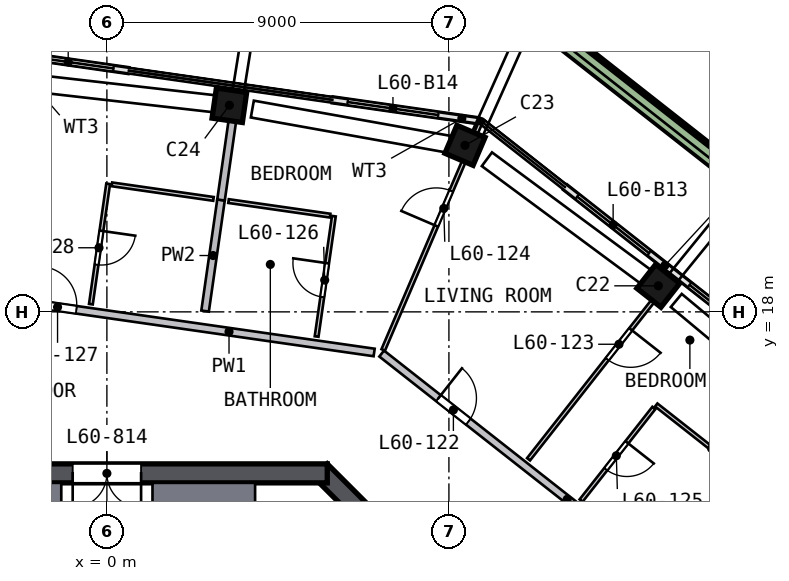
"""IFC4 building model, lengths in metres.
Left out: names, types, materials, properties, quantities, classifications, styles, units other than length and angle.
Written with IfcOpenShell. Run it as: python <this file> out.ifc"""

import sys

from ifc_helpers import new_model, si_unit, direction, frame, frame_2d, origin, origin_2d, place, context, subcontext, project, spatial, polyline, rectangle, outline, extrude, element, fill, save


model = new_model("IFC4")
c1 = context("Model", 3, precision=1e-05, world=origin(), true_north=direction((0.0, 1.0)))
c2 = subcontext(c1, "Body", "Model", "MODEL_VIEW")
j1 = project(units=[si_unit("LENGTHUNIT", "METRE"), si_unit("PLANEANGLEUNIT", "RADIAN")], contexts=[c1])
p1 = place(None, origin())
s1 = spatial("IfcSite", under=j1, at=p1, CompositionType="ELEMENT")
p2 = place(p1, origin())
s2 = spatial("IfcBuilding", under=s1, at=p2, CompositionType="ELEMENT")
p3 = place(p2, frame((0.0, 0.0, 244.5)))
s3 = spatial("IfcBuildingStorey", under=s2, at=p3, CompositionType="ELEMENT", Elevation=244.5)
p4 = place(p3, frame((14.617, 18.602, 0.0), z_axis=(-0.089052954, 0.068747968, 0.993651492), x_axis=(-0.781361755, 0.613855028, -0.112498053)))
e1 = element("IfcColumn", 1, at=p4, inside=s3, PredefinedType="COLUMN", context=c2, shape_type="SweptSolid", body=[
    extrude(rectangle(XDim=0.8, YDim=0.8, at=origin_2d()), origin(), (0.0, 0.0, 1.0), 3.21),
])
p5 = place(p3, frame((9.552, 22.329, 0.0), z_axis=(-0.106507884, 0.044549336, 0.993313358), x_axis=(0.913094462, -0.391063778, 0.115445333)))
e2 = element("IfcColumn", 2, at=p5, inside=s3, PredefinedType="COLUMN", context=c2, shape_type="SweptSolid", body=[
    extrude(rectangle(XDim=0.8, YDim=0.8, at=origin_2d()), origin(), (0.0, 0.0, 1.0), 3.211),
])
p6 = place(p3, frame((3.358, 23.419, 0.0), z_axis=(-0.111487333, 0.015057634, 0.993651771), x_axis=(-0.98354748, 0.141347432, -0.112495591)))
e3 = element("IfcColumn", 3, at=p6, inside=s3, PredefinedType="COLUMN", context=c2, shape_type="SweptSolid", body=[
    extrude(rectangle(XDim=0.8, YDim=0.8, at=origin_2d()), origin(), (0.0, 0.0, 1.0), 3.21),
])
p7 = place(p3, frame((13.823, 5.622, 0.0), z_axis=(0.0, 0.0, 1.0), x_axis=(-0.707106781, 0.707106781, 0.0)))
e4 = element("IfcWall", 4, at=p7, inside=s3, PredefinedType="SHEAR", context=c2, shape_type="SweptSolid", body=[
    extrude(rectangle(XDim=11.598, YDim=0.5, at=frame_2d((5.799, 0.0))), origin(), (0.0, 0.0, 1.0), 3.5),
])
p8 = place(p7, frame((2.099, 0.0, 0.0)))
e5 = element("IfcOpeningElement", 5, at=p8, cuts=e4, PredefinedType="OPENING", context=c2, shape_type="SweptSolid", body=[
    extrude(rectangle(XDim=1.2, YDim=2.1, at=frame_2d((0.6, 1.05))), frame((0.0, 0.26, 0.0), z_axis=(0.0, -1.0, 0.0), x_axis=(1.0, 0.0, 0.0)), (0.0, 0.0, 1.0), 0.52),
])
p9 = place(p3, frame((5.799, 13.75, 0.0), z_axis=(0.0, 0.0, 1.0), x_axis=(-1.0, 0.0, 0.0)))
e6 = element("IfcWall", 6, at=p9, inside=s3, PredefinedType="SHEAR", context=c2, shape_type="SweptSolid", body=[
    extrude(rectangle(XDim=11.598, YDim=0.5, at=frame_2d((5.799, 0.0))), origin(), (0.0, 0.0, 1.0), 3.5),
])
p10 = place(p9, frame((4.899, 0.0, 0.0)))
e7 = element("IfcOpeningElement", 7, at=p10, cuts=e6, PredefinedType="OPENING", context=c2, shape_type="SweptSolid", body=[
    extrude(rectangle(XDim=1.8, YDim=2.1, at=frame_2d((0.9, 1.05))), frame((0.0, 0.26, 0.0), z_axis=(0.0, -1.0, 0.0), x_axis=(1.0, 0.0, 0.0)), (0.0, 0.0, 1.0), 0.52),
])
p11 = place(p3, frame((17.537, 16.976, 0.0), z_axis=(0.0, 0.0, 1.0), x_axis=(-0.786266993, 0.617886896, 0.0)))
e8 = element("IfcWall", 8, at=p11, inside=s3, PredefinedType="SOLIDWALL", context=c2, shape_type="SweptSolid", body=[
    extrude(rectangle(XDim=3.3, YDim=0.15, at=frame_2d((1.65, 0.0))), origin(), (0.0, 0.0, 1.0), 2.525),
])
p12 = place(p11, frame((0.4, 0.0, 0.0)))
e9 = element("IfcOpeningElement", 9, at=p12, cuts=e8, PredefinedType="OPENING", context=c2, shape_type="SweptSolid", body=[
    extrude(rectangle(XDim=2.4, YDim=2.4, at=frame_2d((1.2, 1.2))), frame((0.0, 0.085, 0.0), z_axis=(0.0, -1.0, 0.0), x_axis=(1.0, 0.0, 0.0)), (0.0, 0.0, 1.0), 0.17),
])
p13 = place(p3, frame((14.942, 19.015, 0.0), z_axis=(0.0, 0.0, 1.0), x_axis=(-0.786290572, 0.61785689, 0.0)))
e10 = element("IfcWall", 10, at=p13, inside=s3, PredefinedType="SOLIDWALL", context=c2, shape_type="SweptSolid", body=[
    extrude(rectangle(XDim=3.661, YDim=0.15, at=frame_2d((1.831, 0.0))), origin(), (0.0, 0.0, 1.0), 2.525),
])
p14 = place(p13, frame((0.861, 0.0, 0.0)))
e11 = element("IfcOpeningElement", 11, at=p14, cuts=e10, PredefinedType="OPENING", context=c2, shape_type="SweptSolid", body=[
    extrude(rectangle(XDim=2.4, YDim=2.4, at=frame_2d((1.2, 1.2))), frame((0.0, 0.085, 0.0), z_axis=(0.0, -1.0, 0.0), x_axis=(1.0, 0.0, 0.0)), (0.0, 0.0, 1.0), 0.17),
])
p15 = place(p3, frame((9.768, 23.03, 0.0), z_axis=(0.0, 0.0, 1.0), x_axis=(-0.989874782, 0.141943354, 0.0)))
e12 = element("IfcWall", 12, at=p15, inside=s3, PredefinedType="SOLIDWALL", context=c2, shape_type="SweptSolid", body=[
    extrude(rectangle(XDim=3.863, YDim=0.15, at=frame_2d((1.932, 0.0))), origin(), (0.0, 0.0, 1.0), 2.525),
])
p16 = place(p15, frame((1.063, 0.0, 0.0)))
e13 = element("IfcOpeningElement", 13, at=p16, cuts=e12, PredefinedType="OPENING", context=c2, shape_type="SweptSolid", body=[
    extrude(rectangle(XDim=2.4, YDim=2.4, at=frame_2d((1.2, 1.2))), frame((0.0, 0.085, 0.0), z_axis=(0.0, -1.0, 0.0), x_axis=(1.0, 0.0, 0.0)), (0.0, 0.0, 1.0), 0.17),
])
p17 = place(p3, frame((0.566, 24.35, 0.0), z_axis=(0.0, 0.0, 1.0), x_axis=(-0.989878305, 0.141918786, 0.0)))
e14 = element("IfcWall", 14, at=p17, inside=s3, PredefinedType="SOLIDWALL", context=c2, shape_type="SweptSolid", body=[
    extrude(rectangle(XDim=3.504, YDim=0.15, at=frame_2d((1.752, 0.0))), origin(), (0.0, 0.0, 1.0), 2.525),
])
p18 = place(p17, frame((0.4, 0.0, 0.0)))
e15 = element("IfcOpeningElement", 15, at=p18, cuts=e14, PredefinedType="OPENING", context=c2, shape_type="SweptSolid", body=[
    extrude(rectangle(XDim=2.4, YDim=2.4, at=frame_2d((1.2, 1.2))), frame((0.0, 0.085, 0.0), z_axis=(0.0, -1.0, 0.0), x_axis=(1.0, 0.0, 0.0)), (0.0, 0.0, 1.0), 0.17),
])
p19 = place(p3, frame((21.529, 17.687, 0.0), z_axis=(0.0, 0.0, 1.0), x_axis=(-0.78629143, 0.617855798, 0.0)))
e16 = element("IfcWall", 16, at=p19, inside=s3, PredefinedType="SOLIDWALL", context=c2, shape_type="SweptSolid", body=[
    extrude(rectangle(XDim=13.223, YDim=0.5, at=frame_2d((6.612, 0.0))), origin(), (0.0, 0.0, 1.0), 0.7),
])
p20 = place(p3, origin())
e17 = element("IfcWall", 17, at=p20, inside=s3, PredefinedType="SOLIDWALL", context=c2, shape_type="SweptSolid", body=[
    extrude(outline(polyline([(3.9, 9.9), (3.7, 9.9), (3.7, 12.9), (1.4, 12.9), (1.4, 9.9), (1.2, 9.9), (1.2, 13.5), (3.9, 13.5), (3.9, 9.9)])), origin(), (0.0, 0.0, 1.0), 3.19),
])
p21 = place(p3, origin())
e18 = element("IfcWall", 18, at=p21, inside=s3, PredefinedType="SOLIDWALL", context=c2, shape_type="SweptSolid", body=[
    extrude(outline(polyline([(-3.9, 13.5), (-1.2, 13.5), (-1.2, 9.9), (-1.4, 9.9), (-1.4, 12.9), (-3.7, 12.9), (-3.7, 9.9), (-3.9, 9.9), (-3.9, 13.5)])), origin(), (0.0, 0.0, 1.0), 3.19),
])
p22 = place(p3, frame((-1.991, 18.226, 0.0), z_axis=(0.0, 0.0, 1.0), x_axis=(0.98987168, -0.141964985, 0.0)))
e19 = element("IfcWall", 19, at=p22, inside=s3, PredefinedType="SOLIDWALL", context=c2, shape_type="SweptSolid", body=[
    extrude(rectangle(XDim=9.116, YDim=0.2, at=frame_2d((4.558, 0.0))), origin(), (0.0, 0.0, 1.0), 3.19),
])
p23 = place(p22, frame((0.2, 0.0, 0.0)))
e20 = element("IfcOpeningElement", 20, at=p23, cuts=e19, PredefinedType="OPENING", context=c2, shape_type="SweptSolid", body=[
    extrude(rectangle(XDim=1.0, YDim=2.1, at=frame_2d((0.5, 1.05))), frame((0.0, 0.11, 0.0), z_axis=(0.0, -1.0, 0.0), x_axis=(1.0, 0.0, 0.0)), (0.0, 0.0, 1.0), 0.22),
])
p24 = place(p3, frame((7.231, 16.903, 0.0), z_axis=(0.0, 0.0, 1.0), x_axis=(0.786294696, -0.617851641, 0.0)))
e21 = element("IfcWall", 21, at=p24, inside=s3, PredefinedType="SOLIDWALL", context=c2, shape_type="SweptSolid", body=[
    extrude(rectangle(XDim=9.317, YDim=0.2, at=frame_2d((4.658, 0.0))), origin(), (0.0, 0.0, 1.0), 3.19),
])
p25 = place(p24, frame((1.9, 0.0, 0.0)))
e22 = element("IfcOpeningElement", 22, at=p25, cuts=e21, PredefinedType="OPENING", context=c2, shape_type="SweptSolid", body=[
    extrude(rectangle(XDim=1.0, YDim=2.1, at=frame_2d((0.5, 1.05))), frame((0.0, 0.11, 0.0), z_axis=(0.0, -1.0, 0.0), x_axis=(1.0, 0.0, 0.0)), (0.0, 0.0, 1.0), 0.22),
])
p26 = place(p3, frame((2.584, 18.021, 0.0), z_axis=(0.0, 0.0, 1.0), x_axis=(0.141965384, 0.989871623, 0.0)))
e23 = element("IfcWall", 23, at=p26, inside=s3, PredefinedType="SOLIDWALL", context=c2, shape_type="SweptSolid", body=[
    extrude(rectangle(XDim=2.953, YDim=0.2, at=frame_2d((1.476, 0.0))), origin(), (0.0, 0.0, 1.0), 3.19),
])
p27 = place(p3, frame((3.003, 20.944, 0.0), z_axis=(0.0, 0.0, 1.0), x_axis=(0.141931131, 0.989876535, 0.0)))
e24 = element("IfcWall", 24, at=p27, inside=s3, PredefinedType="SOLIDWALL", context=c2, shape_type="SweptSolid", body=[
    extrude(rectangle(XDim=2.95, YDim=0.2, at=frame_2d((1.475, 0.0))), origin(), (0.0, 0.0, 1.0), 3.19),
])
p28 = place(p3, frame((14.796, 11.085, 0.0), z_axis=(0.0, 0.0, 1.0), x_axis=(0.800291284, 0.599611424, 0.0)))
e25 = element("IfcWall", 25, at=p28, inside=s3, PredefinedType="SOLIDWALL", context=c2, shape_type="SweptSolid", body=[
    extrude(rectangle(XDim=3.418, YDim=0.2, at=frame_2d((1.709, 0.0))), origin(), (0.0, 0.0, 1.0), 3.19),
])
p29 = place(p3, frame((0.033, 21.37, 0.0), z_axis=(0.0, 0.0, 1.0), x_axis=(-0.141912692, -0.989879178, 0.0)))
e26 = element("IfcWall", 26, at=p29, inside=s3, PredefinedType="PARTITIONING", context=c2, shape_type="SweptSolid", body=[
    extrude(rectangle(XDim=3.2, YDim=0.1, at=frame_2d((1.6, 0.0))), origin(), (0.0, 0.0, 1.0), 3.19),
])
p30 = place(p29, frame((1.25, 0.0, 0.0)))
e27 = element("IfcOpeningElement", 27, at=p30, cuts=e26, PredefinedType="OPENING", context=c2, shape_type="SweptSolid", body=[
    extrude(rectangle(XDim=0.9, YDim=2.1, at=frame_2d((0.45, 1.05))), frame((0.0, 0.06, 0.0), z_axis=(0.0, -1.0, 0.0), x_axis=(1.0, 0.0, 0.0)), (0.0, 0.0, 1.0), 0.12),
])
for number, where, z_axis, x_axis in (
    (28, (0.133, 21.356, 0.0), (0.0, 0.0, 1.0), (0.99, -0.142, 0.0)),
    (29, (5.874, 20.532, 0.0), (0.0, 0.0, 1.0), (-0.99, 0.142, 0.0)),
):
    element("IfcWall", number, at=place(p3, frame(where, z_axis=z_axis, x_axis=x_axis)), inside=s3, PredefinedType="PARTITIONING", context=c2, shape_type="SweptSolid", body=[
        extrude(rectangle(XDim=2.7, YDim=0.1, at=frame_2d((1.35, 0.0))), origin(), (0.0, 0.0, 1.0), 3.19),
    ])
p31 = place(p3, frame((5.519, 17.351, 0.0), z_axis=(0.0, 0.0, 1.0), x_axis=(0.141976729, 0.989869996, 0.0)))
e30 = element("IfcWall", 30, at=p31, inside=s3, PredefinedType="PARTITIONING", context=c2, shape_type="SweptSolid", body=[
    extrude(rectangle(XDim=3.2, YDim=0.1, at=frame_2d((1.6, 0.0))), origin(), (0.0, 0.0, 1.0), 3.19),
])
p32 = place(p31, frame((1.05, 0.0, 0.0)))
e31 = element("IfcOpeningElement", 31, at=p32, cuts=e30, PredefinedType="OPENING", context=c2, shape_type="SweptSolid", body=[
    extrude(rectangle(XDim=0.9, YDim=2.1, at=frame_2d((0.45, 1.05))), frame((0.0, 0.06, 0.0), z_axis=(0.0, -1.0, 0.0), x_axis=(1.0, 0.0, 0.0)), (0.0, 0.0, 1.0), 0.12),
])
p33 = place(p3, frame((7.271, 16.998, 0.0), z_axis=(0.0, 0.0, 1.0), x_axis=(0.393295843, 0.919411975, 0.0)))
e32 = element("IfcWall", 32, at=p33, inside=s3, PredefinedType="PARTITIONING", context=c2, shape_type="SweptSolid", body=[
    extrude(rectangle(XDim=6.476, YDim=0.1, at=frame_2d((3.238, 0.0))), origin(), (0.0, 0.0, 1.0), 3.19),
])
p34 = place(p33, frame((3.55, 0.0, 0.0)))
e33 = element("IfcOpeningElement", 33, at=p34, cuts=e32, PredefinedType="OPENING", context=c2, shape_type="SweptSolid", body=[
    extrude(rectangle(XDim=1.0, YDim=2.1, at=frame_2d((0.5, 1.05))), frame((0.0, 0.06, 0.0), z_axis=(0.0, -1.0, 0.0), x_axis=(1.0, 0.0, 0.0)), (0.0, 0.0, 1.0), 0.12),
])
p35 = place(p3, frame((14.896, 18.956, 0.0), z_axis=(0.0, 0.0, 1.0), x_axis=(-0.617854862, -0.786292165, 0.0)))
e34 = element("IfcWall", 34, at=p35, inside=s3, PredefinedType="PARTITIONING", context=c2, shape_type="SweptSolid", body=[
    extrude(rectangle(XDim=6.15, YDim=0.1, at=frame_2d((3.075, 0.0))), origin(), (0.0, 0.0, 1.0), 3.19),
])
p36 = place(p35, frame((1.8, 0.0, 0.0)))
e35 = element("IfcOpeningElement", 35, at=p36, cuts=e34, PredefinedType="OPENING", context=c2, shape_type="SweptSolid", body=[
    extrude(rectangle(XDim=1.0, YDim=2.1, at=frame_2d((0.5, 1.05))), frame((0.0, 0.06, 0.0), z_axis=(0.0, -1.0, 0.0), x_axis=(1.0, 0.0, 0.0)), (0.0, 0.0, 1.0), 0.12),
])
p37 = place(p3, frame((14.394, 15.471, 0.0), z_axis=(0.0, 0.0, 1.0), x_axis=(-0.617842421, -0.786301941, 0.0)))
e36 = element("IfcWall", 36, at=p37, inside=s3, PredefinedType="PARTITIONING", context=c2, shape_type="SweptSolid", body=[
    extrude(rectangle(XDim=3.1, YDim=0.1, at=frame_2d((1.55, 0.0))), origin(), (0.0, 0.0, 1.0), 3.19),
])
p38 = place(p37, frame((1.15, 0.0, 0.0)))
e37 = element("IfcOpeningElement", 37, at=p38, cuts=e36, PredefinedType="OPENING", context=c2, shape_type="SweptSolid", body=[
    extrude(rectangle(XDim=0.9, YDim=2.1, at=frame_2d((0.45, 1.05))), frame((0.0, 0.06, 0.0), z_axis=(0.0, -1.0, 0.0), x_axis=(1.0, 0.0, 0.0)), (0.0, 0.0, 1.0), 0.12),
])
p39 = place(p3, frame((17.368, 13.262, 0.0), z_axis=(0.0, 0.0, 1.0), x_axis=(-0.786336636, 0.617798264, 0.0)))
e38 = element("IfcWall", 38, at=p39, inside=s3, PredefinedType="PARTITIONING", context=c2, shape_type="SweptSolid", body=[
    extrude(rectangle(XDim=3.704, YDim=0.1, at=frame_2d((1.852, 0.0))), origin(), (0.0, 0.0, 1.0), 3.19),
])
p40 = place(p12, origin())
e39 = element("IfcDoor", 39, at=p40, inside=s3, OperationType="SLIDING_TO_RIGHT", PredefinedType="DOOR", context=c2, shape_type="SweptSolid", body=[
    extrude(rectangle(XDim=2.4, YDim=2.4, at=frame_2d((1.2, 1.2))), frame((0.0, 0.025, 0.0), z_axis=(0.0, -1.0, 0.0), x_axis=(1.0, 0.0, 0.0)), (0.0, 0.0, 1.0), 0.05),
])
fill(e9, e39)
p41 = place(p14, origin())
e40 = element("IfcDoor", 40, at=p41, inside=s3, OperationType="SLIDING_TO_LEFT", PredefinedType="DOOR", context=c2, shape_type="SweptSolid", body=[
    extrude(rectangle(XDim=2.4, YDim=2.4, at=frame_2d((1.2, 1.2))), frame((0.0, 0.025, 0.0), z_axis=(0.0, -1.0, 0.0), x_axis=(1.0, 0.0, 0.0)), (0.0, 0.0, 1.0), 0.05),
])
fill(e11, e40)
p42 = place(p16, origin())
e41 = element("IfcDoor", 41, at=p42, inside=s3, OperationType="SLIDING_TO_LEFT", PredefinedType="DOOR", context=c2, shape_type="SweptSolid", body=[
    extrude(rectangle(XDim=2.4, YDim=2.4, at=frame_2d((1.2, 1.2))), frame((0.0, 0.025, 0.0), z_axis=(0.0, -1.0, 0.0), x_axis=(1.0, 0.0, 0.0)), (0.0, 0.0, 1.0), 0.05),
])
fill(e13, e41)
p43 = place(p18, origin())
e42 = element("IfcDoor", 42, at=p43, inside=s3, OperationType="SLIDING_TO_RIGHT", PredefinedType="DOOR", context=c2, shape_type="SweptSolid", body=[
    extrude(rectangle(XDim=2.4, YDim=2.4, at=frame_2d((1.2, 1.2))), frame((0.0, 0.025, 0.0), z_axis=(0.0, -1.0, 0.0), x_axis=(1.0, 0.0, 0.0)), (0.0, 0.0, 1.0), 0.05),
])
fill(e15, e42)
p44 = place(p10, origin())
e43 = element("IfcDoor", 43, at=p44, inside=s3, OperationType="DOUBLE_DOOR_SINGLE_SWING", PredefinedType="DOOR", context=c2, shape_type="SweptSolid", body=[
    extrude(rectangle(XDim=1.8, YDim=2.1, at=frame_2d((0.9, 1.05))), frame((0.0, 0.025, 0.0), z_axis=(0.0, -1.0, 0.0), x_axis=(1.0, 0.0, 0.0)), (0.0, 0.0, 1.0), 0.05),
])
fill(e7, e43)
p45 = place(p25, origin())
e44 = element("IfcDoor", 44, at=p45, inside=s3, OperationType="SINGLE_SWING_LEFT", PredefinedType="DOOR", context=c2, shape_type="SweptSolid", body=[
    extrude(rectangle(XDim=1.0, YDim=2.1, at=frame_2d((0.5, 1.05))), frame((0.0, 0.025, 0.0), z_axis=(0.0, -1.0, 0.0), x_axis=(1.0, 0.0, 0.0)), (0.0, 0.0, 1.0), 0.05),
])
fill(e22, e44)
p46 = place(p36, origin())
e45 = element("IfcDoor", 45, at=p46, inside=s3, OperationType="SINGLE_SWING_LEFT", PredefinedType="DOOR", context=c2, shape_type="SweptSolid", body=[
    extrude(rectangle(XDim=1.0, YDim=2.1, at=frame_2d((0.5, 1.05))), frame((0.0, 0.025, 0.0), z_axis=(0.0, -1.0, 0.0), x_axis=(1.0, 0.0, 0.0)), (0.0, 0.0, 1.0), 0.05),
])
fill(e35, e45)
p47 = place(p34, origin())
e46 = element("IfcDoor", 46, at=p47, inside=s3, OperationType="SINGLE_SWING_LEFT", PredefinedType="DOOR", context=c2, shape_type="SweptSolid", body=[
    extrude(rectangle(XDim=1.0, YDim=2.1, at=frame_2d((0.5, 1.05))), frame((0.0, 0.025, 0.0), z_axis=(0.0, -1.0, 0.0), x_axis=(1.0, 0.0, 0.0)), (0.0, 0.0, 1.0), 0.05),
])
fill(e33, e46)
p48 = place(p38, origin())
e47 = element("IfcDoor", 47, at=p48, inside=s3, OperationType="SINGLE_SWING_LEFT", PredefinedType="DOOR", context=c2, shape_type="SweptSolid", body=[
    extrude(rectangle(XDim=0.9, YDim=2.1, at=frame_2d((0.45, 1.05))), frame((0.0, 0.025, 0.0), z_axis=(0.0, -1.0, 0.0), x_axis=(1.0, 0.0, 0.0)), (0.0, 0.0, 1.0), 0.05),
])
fill(e37, e47)
p49 = place(p32, origin())
e48 = element("IfcDoor", 48, at=p49, inside=s3, OperationType="SINGLE_SWING_RIGHT", PredefinedType="DOOR", context=c2, shape_type="SweptSolid", body=[
    extrude(rectangle(XDim=0.9, YDim=2.1, at=frame_2d((0.45, 1.05))), frame((0.0, 0.025, 0.0), z_axis=(0.0, -1.0, 0.0), x_axis=(1.0, 0.0, 0.0)), (0.0, 0.0, 1.0), 0.05),
])
fill(e31, e48)
p50 = place(p23, origin())
e49 = element("IfcDoor", 49, at=p50, inside=s3, OperationType="SINGLE_SWING_LEFT", PredefinedType="DOOR", context=c2, shape_type="SweptSolid", body=[
    extrude(rectangle(XDim=1.0, YDim=2.1, at=frame_2d((0.5, 1.05))), frame((0.0, 0.025, 0.0), z_axis=(0.0, -1.0, 0.0), x_axis=(1.0, 0.0, 0.0)), (0.0, 0.0, 1.0), 0.05),
])
fill(e20, e49)
p51 = place(p30, origin())
e50 = element("IfcDoor", 50, at=p51, inside=s3, OperationType="SINGLE_SWING_LEFT", PredefinedType="DOOR", context=c2, shape_type="SweptSolid", body=[
    extrude(rectangle(XDim=0.9, YDim=2.1, at=frame_2d((0.45, 1.05))), frame((0.0, 0.025, 0.0), z_axis=(0.0, -1.0, 0.0), x_axis=(1.0, 0.0, 0.0)), (0.0, 0.0, 1.0), 0.05),
])
fill(e27, e50)
save(model, sys.argv[1])
